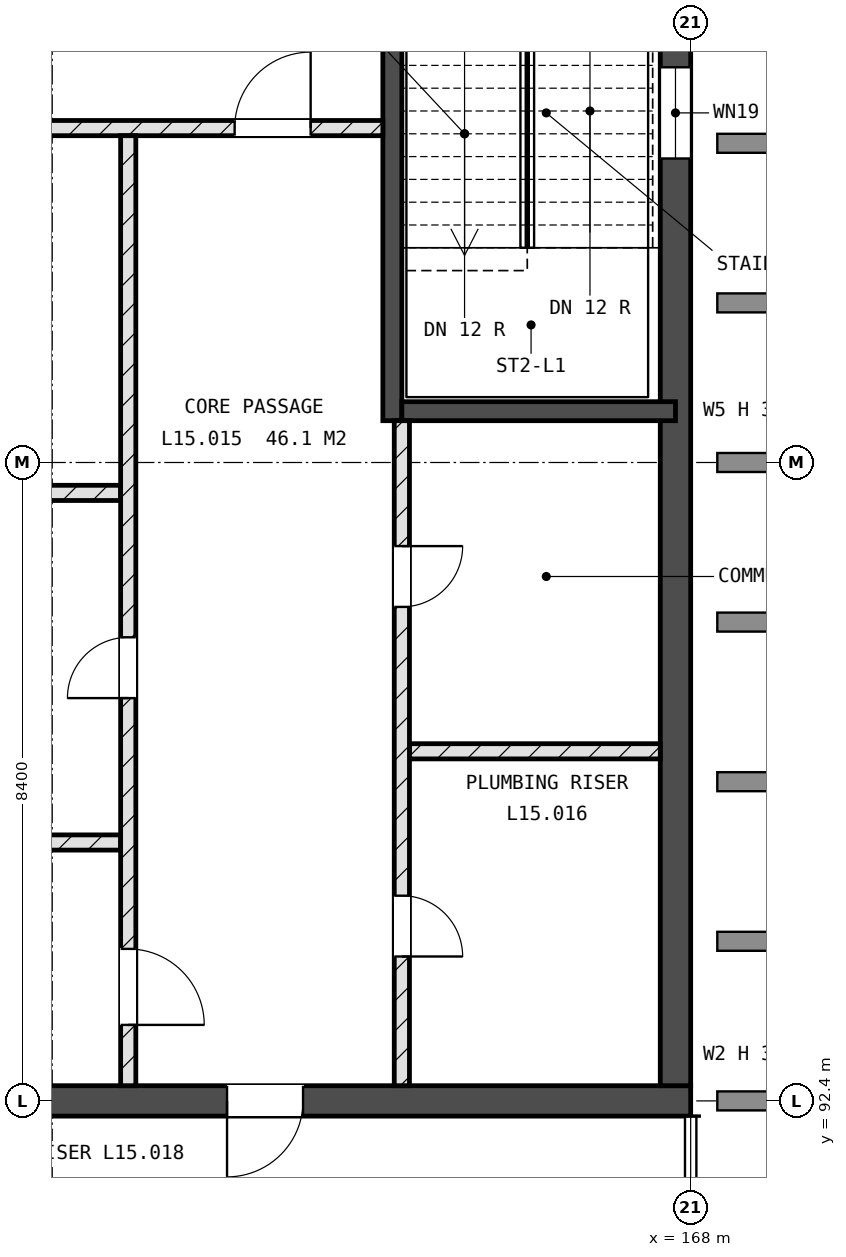
"""IFC4 building model, lengths in metres.
Left out: names, types, materials, properties, quantities, classifications, styles, units other than length and angle.
Written with IfcOpenShell. Run it as: python <this file> out.ifc"""

import sys

from ifc_helpers import new_model, si_unit, direction, frame, frame_2d, origin, place, context, subcontext, project, spatial, rectangle, extrude, element, fill, save


model = new_model("IFC4")
c1 = context("Model", 3, precision=1e-05, world=origin(), true_north=direction((0.0, 1.0)))
c2 = subcontext(c1, "Body", "Model", "MODEL_VIEW")
j1 = project(units=[si_unit("LENGTHUNIT", "METRE"), si_unit("PLANEANGLEUNIT", "RADIAN")], contexts=[c1])
p1 = place(None, origin())
s1 = spatial("IfcSite", under=j1, at=p1, CompositionType="ELEMENT")
p2 = place(p1, origin())
s2 = spatial("IfcBuilding", under=s1, at=p2, CompositionType="ELEMENT")
p3 = place(p2, frame((0.0, 0.0, 57.6)))
s3 = spatial("IfcBuildingStorey", under=s2, at=p3, CompositionType="ELEMENT", Elevation=57.6)
p4 = place(p3, frame((142.8, 92.4, -0.3), z_axis=(0.0, 0.0, 1.0), x_axis=(1.0, 0.0, 0.0)))
e1 = element("IfcWall", 1, at=p4, inside=s3, PredefinedType="SHEAR", context=c2, shape_type="SweptSolid", body=[
    extrude(rectangle(XDim=25.2, YDim=0.4, at=frame_2d((12.6, 0.0))), origin(), (0.0, 0.0, 1.0), 3.6),
])
p5 = place(p4, frame((1.4, 0.0, 0.3)))
e2 = element("IfcOpeningElement", 2, at=p5, cuts=e1, PredefinedType="OPENING", context=c2, shape_type="SweptSolid", body=[
    extrude(rectangle(XDim=1.0, YDim=2.1, at=frame_2d((0.5, 1.05))), frame((0.0, 0.21, 0.0), z_axis=(0.0, -1.0, 0.0), x_axis=(1.0, 0.0, 0.0)), (0.0, 0.0, 1.0), 0.42),
])
p6 = place(p4, frame((19.1, 0.0, 0.3)))
e3 = element("IfcOpeningElement", 3, at=p6, cuts=e1, PredefinedType="OPENING", context=c2, shape_type="SweptSolid", body=[
    extrude(rectangle(XDim=1.0, YDim=2.1, at=frame_2d((0.5, 1.05))), frame((0.0, 0.21, 0.0), z_axis=(0.0, -1.0, 0.0), x_axis=(1.0, 0.0, 0.0)), (0.0, 0.0, 1.0), 0.42),
])
p7 = place(p4, frame((10.4, 0.0, 0.3)))
e4 = element("IfcOpeningElement", 4, at=p7, cuts=e1, PredefinedType="OPENING", context=c2, shape_type="SweptSolid", body=[
    extrude(rectangle(XDim=1.0, YDim=2.1, at=frame_2d((0.5, 1.05))), frame((0.0, 0.21, 0.0), z_axis=(0.0, -1.0, 0.0), x_axis=(1.0, 0.0, 0.0)), (0.0, 0.0, 1.0), 0.42),
])
p8 = place(p3, frame((167.8, 92.6, -0.3), z_axis=(0.0, 0.0, 1.0), x_axis=(0.0, 1.0, 0.0)))
e5 = element("IfcWall", 5, at=p8, inside=s3, PredefinedType="SHEAR", context=c2, shape_type="SweptSolid", body=[
    extrude(rectangle(XDim=16.4, YDim=0.4, at=frame_2d((8.2, 0.0))), origin(), (0.0, 0.0, 1.0), 3.6),
])
p9 = place(p8, frame((12.2, 0.0, 1.9)))
e6 = element("IfcOpeningElement", 6, at=p9, cuts=e5, PredefinedType="OPENING", context=c2, shape_type="SweptSolid", body=[
    extrude(rectangle(XDim=1.2, YDim=0.9, at=frame_2d((0.6, 0.45))), frame((0.0, 0.21, 0.0), z_axis=(0.0, -1.0, 0.0), x_axis=(1.0, 0.0, 0.0)), (0.0, 0.0, 1.0), 0.42),
])
p10 = place(p3, frame((164.075, 101.35, -0.3), z_axis=(0.0, 0.0, 1.0), x_axis=(0.0, 1.0, 0.0)))
e7 = element("IfcWall", 7, at=p10, inside=s3, PredefinedType="SHEAR", context=c2, shape_type="SweptSolid", body=[
    extrude(rectangle(XDim=7.65, YDim=0.25, at=frame_2d((3.825, 0.0))), origin(), (0.0, 0.0, 1.0), 3.6),
])
p11 = place(p10, frame((6.55, 0.0, 0.3)))
e8 = element("IfcOpeningElement", 8, at=p11, cuts=e7, PredefinedType="OPENING", context=c2, shape_type="SweptSolid", body=[
    extrude(rectangle(XDim=1.0, YDim=2.1, at=frame_2d((0.5, 1.05))), frame((0.0, 0.135, 0.0), z_axis=(0.0, -1.0, 0.0), x_axis=(1.0, 0.0, 0.0)), (0.0, 0.0, 1.0), 0.27),
])
p12 = place(p3, frame((164.2, 101.475, -0.3), z_axis=(0.0, 0.0, 1.0), x_axis=(1.0, 0.0, 0.0)))
e9 = element("IfcWall", 9, at=p12, inside=s3, PredefinedType="SHEAR", context=c2, shape_type="SweptSolid", body=[
    extrude(rectangle(XDim=3.6, YDim=0.25, at=frame_2d((1.8, 0.0))), origin(), (0.0, 0.0, 1.0), 3.6),
])
p13 = place(p3, frame((158.25, 95.8, 0.0), z_axis=(0.0, 0.0, 1.0), x_axis=(1.0, 0.0, 0.0)))
e10 = element("IfcWall", 10, at=p13, inside=s3, PredefinedType="SOLIDWALL", context=c2, shape_type="SweptSolid", body=[
    extrude(rectangle(XDim=2.25, YDim=0.2, at=frame_2d((1.125, 0.0))), origin(), (0.0, 0.0, 1.0), 3.3),
])
p14 = place(p3, frame((164.3, 97.0, 0.0), z_axis=(0.0, 0.0, 1.0), x_axis=(1.0, 0.0, 0.0)))
e11 = element("IfcWall", 11, at=p14, inside=s3, PredefinedType="SOLIDWALL", context=c2, shape_type="SweptSolid", body=[
    extrude(rectangle(XDim=3.3, YDim=0.2, at=frame_2d((1.65, 0.0))), origin(), (0.0, 0.0, 1.0), 3.3),
])
p15 = place(p3, frame((146.5, 100.4, 0.0), z_axis=(0.0, 0.0, 1.0), x_axis=(1.0, 0.0, 0.0)))
e12 = element("IfcWall", 12, at=p15, inside=s3, PredefinedType="SOLIDWALL", context=c2, shape_type="SweptSolid", body=[
    extrude(rectangle(XDim=14.0, YDim=0.2, at=frame_2d((7.0, 0.0))), origin(), (0.0, 0.0, 1.0), 3.3),
])
p16 = place(p3, frame((143.2, 105.2, 0.0), z_axis=(0.0, 0.0, 1.0), x_axis=(1.0, 0.0, 0.0)))
e13 = element("IfcWall", 13, at=p16, inside=s3, PredefinedType="SOLIDWALL", context=c2, shape_type="SweptSolid", body=[
    extrude(rectangle(XDim=20.75, YDim=0.2, at=frame_2d((10.375, 0.0))), origin(), (0.0, 0.0, 1.0), 3.3),
])
p17 = place(p16, frame((11.5, 0.0, 0.0)))
e14 = element("IfcOpeningElement", 14, at=p17, cuts=e13, PredefinedType="OPENING", context=c2, shape_type="SweptSolid", body=[
    extrude(rectangle(XDim=0.8, YDim=2.1, at=frame_2d((0.4, 1.05))), frame((0.0, 0.11, 0.0), z_axis=(0.0, -1.0, 0.0), x_axis=(1.0, 0.0, 0.0)), (0.0, 0.0, 1.0), 0.22),
])
p18 = place(p16, frame((18.8, 0.0, 0.0)))
e15 = element("IfcOpeningElement", 15, at=p18, cuts=e13, PredefinedType="OPENING", context=c2, shape_type="SweptSolid", body=[
    extrude(rectangle(XDim=1.0, YDim=2.1, at=frame_2d((0.5, 1.05))), frame((0.0, 0.11, 0.0), z_axis=(0.0, -1.0, 0.0), x_axis=(1.0, 0.0, 0.0)), (0.0, 0.0, 1.0), 0.22),
])
p19 = place(p3, frame((160.6, 92.6, 0.0), z_axis=(0.0, 0.0, 1.0), x_axis=(0.0, 1.0, 0.0)))
e16 = element("IfcWall", 16, at=p19, inside=s3, PredefinedType="SOLIDWALL", context=c2, shape_type="SweptSolid", body=[
    extrude(rectangle(XDim=12.5, YDim=0.2, at=frame_2d((6.25, 0.0))), origin(), (0.0, 0.0, 1.0), 3.3),
])
p20 = place(p19, frame((5.1, 0.0, 0.0)))
e17 = element("IfcOpeningElement", 17, at=p20, cuts=e16, PredefinedType="OPENING", context=c2, shape_type="SweptSolid", body=[
    extrude(rectangle(XDim=0.8, YDim=2.1, at=frame_2d((0.4, 1.05))), frame((0.0, 0.11, 0.0), z_axis=(0.0, -1.0, 0.0), x_axis=(1.0, 0.0, 0.0)), (0.0, 0.0, 1.0), 0.22),
])
p21 = place(p19, frame((0.8, 0.0, 0.0)))
e18 = element("IfcOpeningElement", 18, at=p21, cuts=e16, PredefinedType="OPENING", context=c2, shape_type="SweptSolid", body=[
    extrude(rectangle(XDim=1.0, YDim=2.1, at=frame_2d((0.5, 1.05))), frame((0.0, 0.11, 0.0), z_axis=(0.0, -1.0, 0.0), x_axis=(1.0, 0.0, 0.0)), (0.0, 0.0, 1.0), 0.22),
])
p22 = place(p3, frame((164.2, 92.6, 0.0), z_axis=(0.0, 0.0, 1.0), x_axis=(0.0, 1.0, 0.0)))
e19 = element("IfcWall", 19, at=p22, inside=s3, PredefinedType="SOLIDWALL", context=c2, shape_type="SweptSolid", body=[
    extrude(rectangle(XDim=8.75, YDim=0.2, at=frame_2d((4.375, 0.0))), origin(), (0.0, 0.0, 1.0), 3.3),
])
p23 = place(p22, frame((1.7, 0.0, 0.0)))
e20 = element("IfcOpeningElement", 20, at=p23, cuts=e19, PredefinedType="OPENING", context=c2, shape_type="SweptSolid", body=[
    extrude(rectangle(XDim=0.8, YDim=2.1, at=frame_2d((0.4, 1.05))), frame((0.0, 0.11, 0.0), z_axis=(0.0, -1.0, 0.0), x_axis=(1.0, 0.0, 0.0)), (0.0, 0.0, 1.0), 0.22),
])
p24 = place(p22, frame((6.3, 0.0, 0.0)))
e21 = element("IfcOpeningElement", 21, at=p24, cuts=e19, PredefinedType="OPENING", context=c2, shape_type="SweptSolid", body=[
    extrude(rectangle(XDim=0.8, YDim=2.1, at=frame_2d((0.4, 1.05))), frame((0.0, 0.11, 0.0), z_axis=(0.0, -1.0, 0.0), x_axis=(1.0, 0.0, 0.0)), (0.0, 0.0, 1.0), 0.22),
])
p25 = place(p9, origin())
e22 = element("IfcWindow", 22, at=p25, inside=s3, PartitioningType="SINGLE_PANEL", PredefinedType="WINDOW", context=c2, shape_type="SweptSolid", body=[
    extrude(rectangle(XDim=1.2, YDim=0.9, at=frame_2d((0.6, 0.45))), frame((0.0, 0.03, 0.0), z_axis=(0.0, -1.0, 0.0), x_axis=(1.0, 0.0, 0.0)), (0.0, 0.0, 1.0), 0.06),
])
fill(e6, e22)
p26 = place(p23, origin())
e23 = element("IfcDoor", 23, at=p26, inside=s3, OperationType="SINGLE_SWING_LEFT", PredefinedType="DOOR", context=c2, shape_type="SweptSolid", body=[
    extrude(rectangle(XDim=0.8, YDim=2.1, at=frame_2d((0.4, 1.05))), frame((0.0, 0.025, 0.0), z_axis=(0.0, -1.0, 0.0), x_axis=(1.0, 0.0, 0.0)), (0.0, 0.0, 1.0), 0.05),
])
fill(e20, e23)
p27 = place(p24, origin())
e24 = element("IfcDoor", 24, at=p27, inside=s3, OperationType="SINGLE_SWING_RIGHT", PredefinedType="DOOR", context=c2, shape_type="SweptSolid", body=[
    extrude(rectangle(XDim=0.8, YDim=2.1, at=frame_2d((0.4, 1.05))), frame((0.0, 0.025, 0.0), z_axis=(0.0, -1.0, 0.0), x_axis=(1.0, 0.0, 0.0)), (0.0, 0.0, 1.0), 0.05),
])
fill(e21, e24)
p28 = place(p20, origin())
e25 = element("IfcDoor", 25, at=p28, inside=s3, OperationType="SINGLE_SWING_RIGHT", PredefinedType="DOOR", context=c2, shape_type="SweptSolid", body=[
    extrude(rectangle(XDim=0.8, YDim=2.1, at=frame_2d((0.4, 1.05))), frame((0.0, 0.025, 0.0), z_axis=(0.0, -1.0, 0.0), x_axis=(1.0, 0.0, 0.0)), (0.0, 0.0, 1.0), 0.05),
])
fill(e17, e25)
p29 = place(p6, origin())
e26 = element("IfcDoor", 26, at=p29, inside=s3, OperationType="SINGLE_SWING_LEFT", PredefinedType="DOOR", context=c2, shape_type="SweptSolid", body=[
    extrude(rectangle(XDim=1.0, YDim=2.1, at=frame_2d((0.5, 1.05))), frame((0.0, 0.025, 0.0), z_axis=(0.0, -1.0, 0.0), x_axis=(1.0, 0.0, 0.0)), (0.0, 0.0, 1.0), 0.05),
])
fill(e3, e26)
p30 = place(p21, origin())
e27 = element("IfcDoor", 27, at=p30, inside=s3, OperationType="SINGLE_SWING_LEFT", PredefinedType="DOOR", context=c2, shape_type="SweptSolid", body=[
    extrude(rectangle(XDim=1.0, YDim=2.1, at=frame_2d((0.5, 1.05))), frame((0.0, 0.025, 0.0), z_axis=(0.0, -1.0, 0.0), x_axis=(1.0, 0.0, 0.0)), (0.0, 0.0, 1.0), 0.05),
])
fill(e18, e27)
p31 = place(p18, origin())
e28 = element("IfcDoor", 28, at=p31, inside=s3, OperationType="SINGLE_SWING_LEFT", PredefinedType="DOOR", context=c2, shape_type="SweptSolid", body=[
    extrude(rectangle(XDim=1.0, YDim=2.1, at=frame_2d((0.5, 1.05))), frame((0.0, 0.025, 0.0), z_axis=(0.0, -1.0, 0.0), x_axis=(1.0, 0.0, 0.0)), (0.0, 0.0, 1.0), 0.05),
])
fill(e15, e28)
save(model, sys.argv[1])
